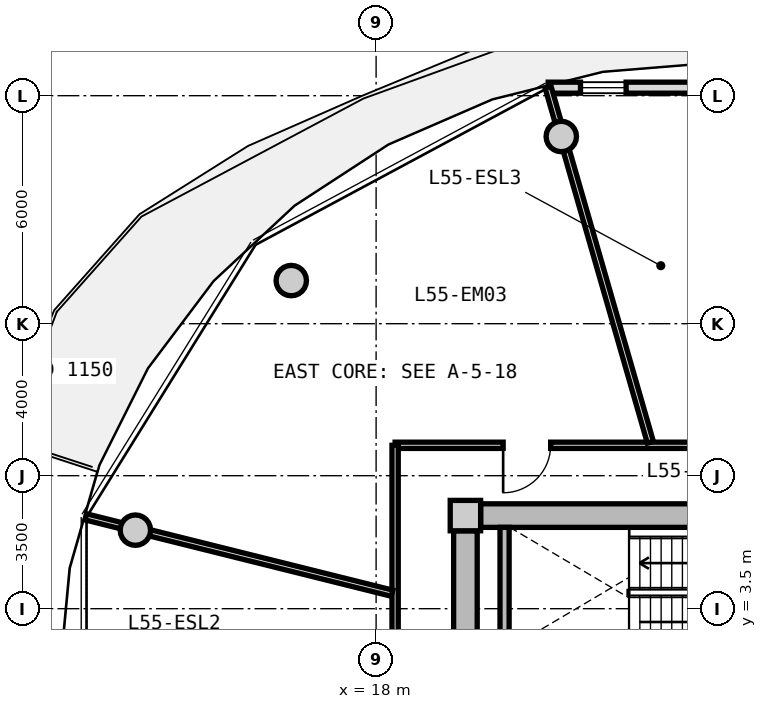
"""IFC4 building model, lengths in metres.
Left out: names, types, materials, properties, quantities, classifications, styles, units other than length and angle.
Written with IfcOpenShell. Run it as: python <this file> out.ifc"""

import sys

from ifc_helpers import new_model, si_unit, direction, frame, frame_2d, origin, origin_2d, place, context, subcontext, project, spatial, rectangle, circle, extrude, source, transform, mapped, element, fill, save


model = new_model("IFC4")
c1 = context("Model", 3, precision=1e-05, world=origin(), true_north=direction((0.0, 1.0)))
c2 = subcontext(c1, "Body", "Model", "MODEL_VIEW")
j1 = project(units=[si_unit("LENGTHUNIT", "METRE"), si_unit("PLANEANGLEUNIT", "RADIAN")], contexts=[c1])
p1 = place(None, origin())
s1 = spatial("IfcSite", under=j1, at=p1, CompositionType="ELEMENT")
p2 = place(p1, origin())
s2 = spatial("IfcBuilding", under=s1, at=p2, CompositionType="ELEMENT")
p3 = place(p2, frame((0.0, 0.0, 177.0)))
s3 = spatial("IfcBuildingStorey", under=s2, at=p3, CompositionType="ELEMENT", Elevation=177.0)
m1 = source(origin(), c2, "Body", "SweptSolid", [
    extrude(rectangle(XDim=0.8, YDim=0.8, at=origin_2d()), origin(), (0.0, 0.0, 1.0), 3.05),
])
p4 = place(p3, frame((20.35, 5.95, 0.0), z_axis=(0.0, 0.0, 1.0), x_axis=(1.0, 0.0, 0.0)))
e1 = element("IfcColumn", 1, at=p4, inside=s3, PredefinedType="COLUMN", context=c2, shape_type="MappedRepresentation", body=[
    mapped(m1, transform((0.0, 0.0, 0.0), x_axis=(1.0, 0.0, 0.0), y_axis=(0.0, 1.0, 0.0), z_axis=(0.0, 0.0, 1.0), scale=1.0)),
])
m2 = source(origin(), c2, "Body", "SweptSolid", [
    extrude(rectangle(XDim=14.5, YDim=0.62, at=frame_2d((7.25, 0.0))), origin(), (0.0, 0.0, 1.0), 2.81),
])
p5 = place(p3, frame((20.75, 5.95, 0.0), z_axis=(0.0, 0.0, 1.0), x_axis=(1.0, 0.0, 0.0)))
e2 = element("IfcWall", 2, at=p5, inside=s3, PredefinedType="SHEAR", context=c2, shape_type="MappedRepresentation", body=[
    mapped(m2, transform((0.0, 0.0, 0.0), x_axis=(1.0, 0.0, 0.0), y_axis=(0.0, 1.0, 0.0), z_axis=(0.0, 0.0, 1.0), scale=1.0)),
])
m3 = source(origin(), c2, "Body", "SweptSolid", [
    extrude(rectangle(XDim=11.1, YDim=0.62, at=frame_2d((5.55, 0.0))), origin(), (0.0, 0.0, 1.0), 2.81),
])
p6 = place(p3, frame((20.35, -5.55, 0.0), z_axis=(0.0, 0.0, 1.0), x_axis=(0.0, 1.0, 0.0)))
e3 = element("IfcWall", 3, at=p6, inside=s3, PredefinedType="SHEAR", context=c2, shape_type="MappedRepresentation", body=[
    mapped(m3, transform((0.0, 0.0, 0.0), x_axis=(1.0, 0.0, 0.0), y_axis=(0.0, 1.0, 0.0), z_axis=(0.0, 0.0, 1.0), scale=1.0)),
])
p7 = place(p6, frame((3.8, 0.0, 0.0)))
e4 = element("IfcOpeningElement", 4, at=p7, cuts=e3, PredefinedType="OPENING", context=c2, shape_type="SweptSolid", body=[
    extrude(rectangle(XDim=1.2, YDim=2.15, at=frame_2d((0.6, 1.075))), frame((0.0, 0.32, 0.0), z_axis=(0.0, -1.0, 0.0), x_axis=(1.0, 0.0, 0.0)), (0.0, 0.0, 1.0), 0.64),
])
m4 = source(origin(), c2, "Body", "SweptSolid", [
    extrude(circle(Radius=0.4, at=origin_2d()), origin(), (0.0, 0.0, 1.0), 3.05),
])
for number, where, z_axis, x_axis in (
    (5, (22.873, 15.926, 0.0), (0.0, 0.0, 1.0), (1.0, 0.0, 0.0)),
    (6, (15.767, 12.135, 0.0), (0.0, 0.0, 1.0), (1.0, 0.0, 0.0)),
    (7, (11.665, 5.567, 0.0), (0.0, 0.0, 1.0), (1.0, 0.0, 0.0)),
):
    element("IfcColumn", number, at=place(p3, frame(where, z_axis=z_axis, x_axis=x_axis)), inside=s3, PredefinedType="COLUMN", context=c2, shape_type="MappedRepresentation", body=[
        mapped(m4, transform((0.0, 0.0, 0.0), x_axis=(1.0, 0.0, 0.0), y_axis=(0.0, 1.0, 0.0), z_axis=(0.0, 0.0, 1.0), scale=1.0)),
    ])
m5 = source(origin(), c2, "Body", "SweptSolid", [
    extrude(rectangle(XDim=8.893, YDim=0.29, at=frame_2d((4.447, 0.0))), origin(), (0.0, 0.0, 1.0), 2.81),
])
p8 = place(p3, frame((22.529, 17.211, 0.0), z_axis=(0.0, 0.0, 1.0), x_axis=(1.0, 0.0, 0.0)))
e8 = element("IfcWall", 8, at=p8, inside=s3, PredefinedType="SOLIDWALL", context=c2, shape_type="MappedRepresentation", body=[
    mapped(m5, transform((0.0, 0.0, 0.0), x_axis=(1.0, 0.0, 0.0), y_axis=(0.0, 1.0, 0.0), z_axis=(0.0, 0.0, 1.0), scale=1.0)),
])
p9 = place(p8, frame((6.82, 0.0, 0.0)))
e9 = element("IfcOpeningElement", 9, at=p9, cuts=e8, PredefinedType="OPENING", context=c2, shape_type="SweptSolid", body=[
    extrude(rectangle(XDim=1.15, YDim=2.25, at=frame_2d((0.575, 1.125))), frame((0.0, 0.155, 0.0), z_axis=(0.0, -1.0, 0.0), x_axis=(1.0, 0.0, 0.0)), (0.0, 0.0, 1.0), 0.31),
])
p10 = place(p8, frame((0.85, 0.0, 0.85)))
e10 = element("IfcOpeningElement", 10, at=p10, cuts=e8, PredefinedType="OPENING", context=c2, shape_type="SweptSolid", body=[
    extrude(rectangle(XDim=1.2, YDim=1.5, at=frame_2d((0.6, 0.75))), frame((0.0, 0.155, 0.0), z_axis=(0.0, -1.0, 0.0), x_axis=(1.0, 0.0, 0.0)), (0.0, 0.0, 1.0), 0.31),
])
m6 = source(origin(), c2, "Body", "SweptSolid", [
    extrude(rectangle(XDim=3.19, YDim=0.24, at=frame_2d((1.595, 0.0))), origin(), (0.0, 0.0, 1.0), 2.81),
])
p11 = place(p3, frame((21.38, 2.45, 0.0), z_axis=(0.0, 0.0, 1.0), x_axis=(0.0, 1.0, 0.0)))
e11 = element("IfcWall", 11, at=p11, inside=s3, PredefinedType="PARTITIONING", context=c2, shape_type="MappedRepresentation", body=[
    mapped(m6, transform((0.0, 0.0, 0.0), x_axis=(1.0, 0.0, 0.0), y_axis=(0.0, 1.0, 0.0), z_axis=(0.0, 0.0, 1.0), scale=1.0)),
])
m7 = source(origin(), c2, "Body", "SweptSolid", [
    extrude(rectangle(XDim=8.58, YDim=0.165, at=frame_2d((4.29, 0.0))), origin(), (0.0, 0.0, 1.0), 2.795),
])
p12 = place(p3, frame((18.5, 7.8, 0.0), z_axis=(0.0, 0.0, 1.0), x_axis=(1.0, 0.0, 0.0)))
e12 = element("IfcWall", 12, at=p12, inside=s3, PredefinedType="PARTITIONING", context=c2, shape_type="MappedRepresentation", body=[
    mapped(m7, transform((0.0, 0.0, 0.0), x_axis=(1.0, 0.0, 0.0), y_axis=(0.0, 1.0, 0.0), z_axis=(0.0, 0.0, 1.0), scale=1.0)),
])
p13 = place(p12, frame((2.843, 0.0, 0.0)))
e13 = element("IfcOpeningElement", 13, at=p13, cuts=e12, PredefinedType="OPENING", context=c2, shape_type="SweptSolid", body=[
    extrude(rectangle(XDim=1.25, YDim=2.2, at=frame_2d((0.625, 1.1))), frame((0.0, 0.093, 0.0), z_axis=(0.0, -1.0, 0.0), x_axis=(1.0, 0.0, 0.0)), (0.0, 0.0, 1.0), 0.185),
])
m8 = source(origin(), c2, "Body", "SweptSolid", [
    extrude(rectangle(XDim=6.88, YDim=0.165, at=frame_2d((3.44, 0.0))), origin(), (0.0, 0.0, 1.0), 2.795),
])
p14 = place(p3, frame((18.5, 0.92, 0.0), z_axis=(0.0, 0.0, 1.0), x_axis=(0.0, 1.0, 0.0)))
e14 = element("IfcWall", 14, at=p14, inside=s3, PredefinedType="PARTITIONING", context=c2, shape_type="MappedRepresentation", body=[
    mapped(m8, transform((0.0, 0.0, 0.0), x_axis=(1.0, 0.0, 0.0), y_axis=(0.0, 1.0, 0.0), z_axis=(0.0, 0.0, 1.0), scale=1.0)),
])
m9 = source(origin(), c2, "Body", "SweptSolid", [
    extrude(rectangle(XDim=9.73, YDim=0.165, at=frame_2d((4.865, 0.0))), origin(), (0.0, 0.0, 1.0), 2.345),
])
p15 = place(p3, frame((25.217, 7.88, 0.0), z_axis=(0.0, 0.0, 1.0), x_axis=(-0.27679492614, 0.960929013436, 0.0)))
e15 = element("IfcWall", 15, at=p15, inside=s3, PredefinedType="PARTITIONING", context=c2, shape_type="MappedRepresentation", body=[
    mapped(m9, transform((0.0, 0.0, 0.0), x_axis=(1.0, 0.0, 0.0), y_axis=(0.0, 1.0, 0.0), z_axis=(0.0, 0.0, 1.0), scale=1.0)),
])
m10 = source(origin(), c2, "Body", "SweptSolid", [
    extrude(rectangle(XDim=8.305, YDim=0.165, at=frame_2d((4.153, 0.0))), origin(), (0.0, 0.0, 1.0), 2.345),
])
p16 = place(p3, frame((18.42, 3.908, 0.0), z_axis=(0.0, 0.0, 1.0), x_axis=(-0.970309994378, 0.241864662175, 0.0)))
e16 = element("IfcWall", 16, at=p16, inside=s3, PredefinedType="PARTITIONING", context=c2, shape_type="MappedRepresentation", body=[
    mapped(m10, transform((0.0, 0.0, 0.0), x_axis=(1.0, 0.0, 0.0), y_axis=(0.0, 1.0, 0.0), z_axis=(0.0, 0.0, 1.0), scale=1.0)),
])
m11 = source(origin(), c2, "Body", "SweptSolid", [
    extrude(rectangle(XDim=1.2, YDim=1.5, at=frame_2d((0.6, 0.75))), frame((0.0, 0.03, 0.0), z_axis=(0.0, -1.0, 0.0), x_axis=(1.0, 0.0, 0.0)), (0.0, 0.0, 1.0), 0.06),
])
p17 = place(p10, origin())
e17 = element("IfcWindow", 17, at=p17, inside=s3, PartitioningType="SINGLE_PANEL", PredefinedType="WINDOW", context=c2, shape_type="MappedRepresentation", body=[
    mapped(m11, transform((0.0, 0.0, 0.0), x_axis=(1.0, 0.0, 0.0), y_axis=(0.0, 1.0, 0.0), z_axis=(0.0, 0.0, 1.0), scale=1.0)),
])
fill(e10, e17)
m12 = source(origin(), c2, "Body", "SweptSolid", [
    extrude(rectangle(XDim=1.25, YDim=2.2, at=frame_2d((0.625, 1.1))), frame((0.0, 0.025, 0.0), z_axis=(0.0, -1.0, 0.0), x_axis=(1.0, 0.0, 0.0)), (0.0, 0.0, 1.0), 0.05),
])
p18 = place(p13, frame((1.25, 0.0, 0.0), z_axis=(0.0, 0.0, 1.0), x_axis=(-1.0, 0.0, 0.0)))
e18 = element("IfcDoor", 18, at=p18, inside=s3, OperationType="SINGLE_SWING_RIGHT", PredefinedType="DOOR", context=c2, shape_type="MappedRepresentation", body=[
    mapped(m12, transform((0.0, 0.0, 0.0), x_axis=(1.0, 0.0, 0.0), y_axis=(0.0, 1.0, 0.0), z_axis=(0.0, 0.0, 1.0), scale=1.0)),
])
fill(e13, e18)
save(model, sys.argv[1])
